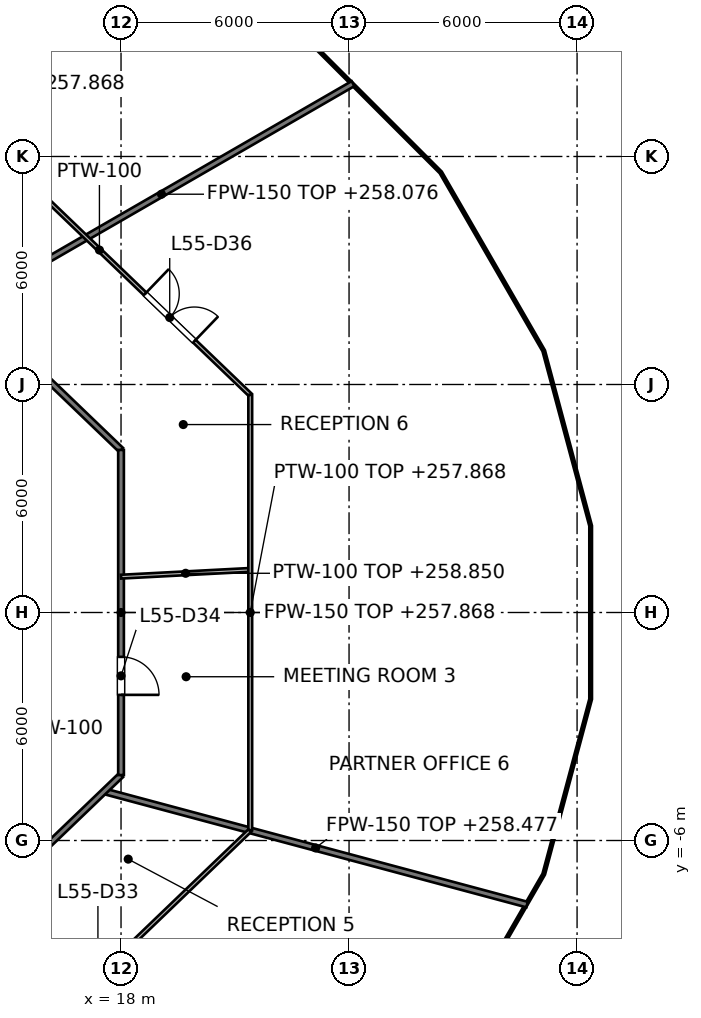
"""IFC4 building model, lengths in metres.
Left out: names, types, materials, properties, quantities, classifications, styles, units other than length and angle.
Written with IfcOpenShell. Run it as: python <this file> out.ifc"""

import sys

from ifc_helpers import new_model, si_unit, direction, frame, frame_2d, origin, place, context, subcontext, project, spatial, rectangle, extrude, element, fill, save


model = new_model("IFC4")
c1 = context("Model", 3, precision=1e-05, world=origin(), true_north=direction((0.0, 1.0)))
c2 = subcontext(c1, "Body", "Model", "MODEL_VIEW")
j1 = project(units=[si_unit("LENGTHUNIT", "METRE"), si_unit("PLANEANGLEUNIT", "RADIAN")], contexts=[c1])
p1 = place(None, origin())
s1 = spatial("IfcSite", under=j1, at=p1, CompositionType="ELEMENT")
p2 = place(p1, origin())
s2 = spatial("IfcBuilding", under=s1, at=p2, CompositionType="ELEMENT")
p3 = place(p2, frame((0.0, 0.0, 255.0)))
s3 = spatial("IfcBuildingStorey", under=s2, at=p3, CompositionType="ELEMENT", Elevation=255.0)
p4 = place(p3, frame((12.095, 9.949, 0.0), z_axis=(0.0, 0.0, 1.0), x_axis=(0.721290181137, -0.692633001376, 0.0)))
e1 = element("IfcWall", 1, at=p4, inside=s3, PredefinedType="PARTITIONING", context=c2, shape_type="SweptSolid", body=[
    extrude(rectangle(XDim=8.187, YDim=0.15, at=frame_2d((4.094, 0.0))), origin(), (0.0, 0.0, 1.0), 2.868),
])
p5 = place(p4, frame((0.839, 0.0, 0.0)))
e2 = element("IfcOpeningElement", 2, at=p5, cuts=e1, PredefinedType="OPENING", context=c2, shape_type="SweptSolid", body=[
    extrude(rectangle(XDim=1.0, YDim=2.1, at=frame_2d((0.5, 1.05))), frame((0.0, 0.075, 0.0), z_axis=(0.0, -1.0, 0.0), x_axis=(1.0, 0.0, 0.0)), (0.0, 0.0, 1.0), 0.15),
])
p6 = place(p4, frame((3.542, 0.0, 0.0)))
e3 = element("IfcOpeningElement", 3, at=p6, cuts=e1, PredefinedType="OPENING", context=c2, shape_type="SweptSolid", body=[
    extrude(rectangle(XDim=1.0, YDim=2.1, at=frame_2d((0.5, 1.05))), frame((0.0, 0.075, 0.0), z_axis=(0.0, -1.0, 0.0), x_axis=(1.0, 0.0, 0.0)), (0.0, 0.0, 1.0), 0.15),
])
p7 = place(p3, frame((17.556, -4.704, 0.0), z_axis=(0.0, 0.0, 1.0), x_axis=(0.9659158877, -0.258856133573, 0.0)))
e4 = element("IfcWall", 4, at=p7, inside=s3, PredefinedType="PARTITIONING", context=c2, shape_type="SweptSolid", body=[
    extrude(rectangle(XDim=11.521, YDim=0.15, at=frame_2d((5.76, 0.0))), origin(), (0.0, 0.0, 1.0), 3.477),
])
p8 = place(p3, frame((14.024, 8.097, 0.0), z_axis=(0.0, 0.0, 1.0), x_axis=(0.866019681863, 0.500009910528, 0.0)))
e5 = element("IfcWall", 5, at=p8, inside=s3, PredefinedType="PARTITIONING", context=c2, shape_type="SweptSolid", body=[
    extrude(rectangle(XDim=11.64, YDim=0.15, at=frame_2d((5.82, 0.0))), origin(), (0.0, 0.0, 1.0), 3.076),
])
p9 = place(p3, frame((12.095, -9.949, 0.0), z_axis=(0.0, 0.0, 1.0), x_axis=(0.721348586031, 0.692572174889, 0.0)))
e6 = element("IfcWall", 6, at=p9, inside=s3, PredefinedType="PARTITIONING", context=c2, shape_type="SweptSolid", body=[
    extrude(rectangle(XDim=8.187, YDim=0.15, at=frame_2d((4.094, 0.0))), origin(), (0.0, 0.0, 1.0), 2.868),
])
p10 = place(p9, frame((3.334, 0.0, 0.0)))
e7 = element("IfcOpeningElement", 7, at=p10, cuts=e6, PredefinedType="OPENING", context=c2, shape_type="SweptSolid", body=[
    extrude(rectangle(XDim=1.0, YDim=2.1, at=frame_2d((0.5, 1.05))), frame((0.0, 0.075, 0.0), z_axis=(0.0, -1.0, 0.0), x_axis=(1.0, 0.0, 0.0)), (0.0, 0.0, 1.0), 0.15),
])
p11 = place(p3, frame((18.0, -4.278, 0.0), z_axis=(0.0, 0.0, 1.0), x_axis=(0.0, 1.0, 0.0)))
e8 = element("IfcWall", 8, at=p11, inside=s3, PredefinedType="PARTITIONING", context=c2, shape_type="SweptSolid", body=[
    extrude(rectangle(XDim=8.556, YDim=0.15, at=frame_2d((4.278, 0.0))), origin(), (0.0, 0.0, 1.0), 2.868),
])
p12 = place(p11, frame((2.111, 0.0, 0.0)))
e9 = element("IfcOpeningElement", 9, at=p12, cuts=e8, PredefinedType="OPENING", context=c2, shape_type="SweptSolid", body=[
    extrude(rectangle(XDim=1.0, YDim=2.1, at=frame_2d((0.5, 1.05))), frame((0.0, 0.075, 0.0), z_axis=(0.0, -1.0, 0.0), x_axis=(1.0, 0.0, 0.0)), (0.0, 0.0, 1.0), 0.15),
])
p13 = place(p3, frame((13.463, 13.349, 0.0), z_axis=(0.0, 0.0, 1.0), x_axis=(0.721293766873, -0.692629267264, 0.0)))
e10 = element("IfcWall", 10, at=p13, inside=s3, PredefinedType="PARTITIONING", context=c2, shape_type="SweptSolid", body=[
    extrude(rectangle(XDim=11.004, YDim=0.1, at=frame_2d((5.502, 0.0))), origin(), (0.0, 0.0, 1.0), 2.927),
])
p14 = place(p13, frame((7.166, 0.0, 0.0)))
e11 = element("IfcOpeningElement", 11, at=p14, cuts=e10, PredefinedType="OPENING", context=c2, shape_type="SweptSolid", body=[
    extrude(rectangle(XDim=1.8, YDim=2.1, at=frame_2d((0.9, 1.05))), frame((0.0, 0.05, 0.0), z_axis=(0.0, -1.0, 0.0), x_axis=(1.0, 0.0, 0.0)), (0.0, 0.0, 1.0), 0.1),
])
p15 = place(p3, frame((18.0, 0.943, 0.0), z_axis=(0.0, 0.0, 1.0), x_axis=(0.998632646467, 0.052276547413, 0.0)))
e12 = element("IfcWall", 12, at=p15, inside=s3, PredefinedType="PARTITIONING", context=c2, shape_type="SweptSolid", body=[
    extrude(rectangle(XDim=3.405, YDim=0.1, at=frame_2d((1.702, 0.0))), origin(), (0.0, 0.0, 1.0), 3.85),
])
p16 = place(p3, frame((13.463, -13.349, 0.0), z_axis=(0.0, 0.0, 1.0), x_axis=(0.721271950356, 0.692651985942, 0.0)))
e13 = element("IfcWall", 13, at=p16, inside=s3, PredefinedType="PARTITIONING", context=c2, shape_type="SweptSolid", body=[
    extrude(rectangle(XDim=10.996, YDim=0.1, at=frame_2d((5.498, 0.0))), origin(), (0.0, 0.0, 1.0), 2.877),
])
p17 = place(p16, frame((4.547, 0.0, 0.0)))
e14 = element("IfcOpeningElement", 14, at=p17, cuts=e13, PredefinedType="OPENING", context=c2, shape_type="SweptSolid", body=[
    extrude(rectangle(XDim=1.8, YDim=2.1, at=frame_2d((0.9, 1.05))), frame((0.0, 0.05, 0.0), z_axis=(0.0, -1.0, 0.0), x_axis=(1.0, 0.0, 0.0)), (0.0, 0.0, 1.0), 0.1),
])
p18 = place(p3, frame((21.4, -5.727, 0.0), z_axis=(0.0, 0.0, 1.0), x_axis=(0.0, 1.0, 0.0)))
e15 = element("IfcWall", 15, at=p18, inside=s3, PredefinedType="PARTITIONING", context=c2, shape_type="SweptSolid", body=[
    extrude(rectangle(XDim=11.454, YDim=0.1, at=frame_2d((5.727, 0.0))), origin(), (0.0, 0.0, 1.0), 2.868),
])
p19 = place(p12, origin())
e16 = element("IfcDoor", 16, at=p19, inside=s3, OperationType="SINGLE_SWING_LEFT", PredefinedType="DOOR", context=c2, shape_type="SweptSolid", body=[
    extrude(rectangle(XDim=1.0, YDim=2.1, at=frame_2d((0.5, 1.05))), frame((0.0, 0.025, 0.0), z_axis=(0.0, -1.0, 0.0), x_axis=(1.0, 0.0, 0.0)), (0.0, 0.0, 1.0), 0.05),
])
fill(e9, e16)
p20 = place(p14, origin())
e17 = element("IfcDoor", 17, at=p20, inside=s3, OperationType="DOUBLE_DOOR_SINGLE_SWING", PredefinedType="DOOR", context=c2, shape_type="SweptSolid", body=[
    extrude(rectangle(XDim=1.8, YDim=2.1, at=frame_2d((0.9, 1.05))), frame((0.0, 0.025, 0.0), z_axis=(0.0, -1.0, 0.0), x_axis=(1.0, 0.0, 0.0)), (0.0, 0.0, 1.0), 0.05),
])
fill(e11, e17)
save(model, sys.argv[1])
